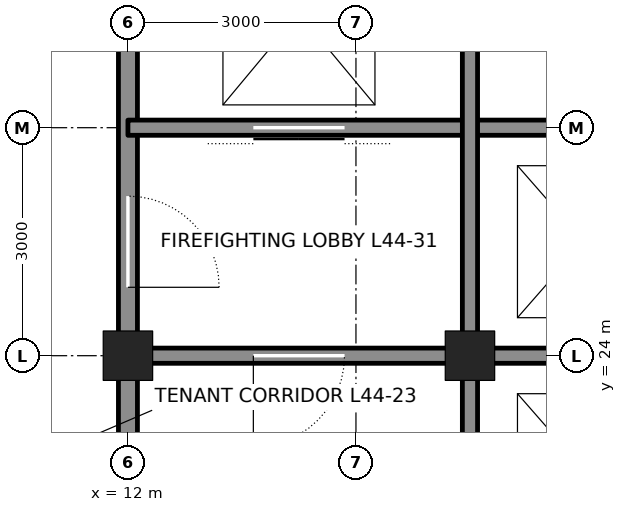
"""IFC4 building model, lengths in metres.
Left out: names, types, materials, properties, quantities, classifications, styles, units other than length and angle.
Written with IfcOpenShell. Run it as: python <this file> out.ifc"""

import sys

from ifc_helpers import new_model, si_unit, direction, frame, frame_2d, origin, origin_2d, place, context, subcontext, project, spatial, rectangle, hollow_rectangle, extrude, element, fill, save


model = new_model("IFC4")
c1 = context("Model", 3, precision=1e-05, world=origin(), true_north=direction((0.0, 1.0)))
c2 = subcontext(c1, "Body", "Model", "MODEL_VIEW")
j1 = project(units=[si_unit("LENGTHUNIT", "METRE"), si_unit("PLANEANGLEUNIT", "RADIAN")], contexts=[c1])
p1 = place(None, origin())
s1 = spatial("IfcSite", under=j1, at=p1, CompositionType="ELEMENT")
p2 = place(p1, origin())
s2 = spatial("IfcBuilding", under=s1, at=p2, CompositionType="ELEMENT")
p3 = place(p2, frame((0.0, 0.0, 201.3)))
s3 = spatial("IfcBuildingStorey", under=s2, at=p3, CompositionType="ELEMENT", Elevation=201.3)
for number, where, z_axis, x_axis in (
    (1, (12.0, 24.0, 0.0), (0.0, 0.0, 1.0), (1.0, 0.0, 0.0)),
    (2, (16.5, 24.0, 0.0), (0.0, 0.0, 1.0), (1.0, 0.0, 0.0)),
):
    element("IfcColumn", number, at=place(p3, frame(where, z_axis=z_axis, x_axis=x_axis)), inside=s3, PredefinedType="COLUMN", context=c2, shape_type="SweptSolid", body=[
        extrude(hollow_rectangle(XDim=0.65, YDim=0.65, WallThickness=0.065, at=origin_2d()), origin(), (0.0, 0.0, 1.0), 4.2),
    ])
p4 = place(p3, frame((12.0, 21.25, 0.0), z_axis=(0.0, 0.0, 1.0), x_axis=(0.0, 1.0, 0.0)))
e3 = element("IfcWall", 3, at=p4, inside=s3, PredefinedType="SOLIDWALL", context=c2, shape_type="SweptSolid", body=[
    extrude(rectangle(XDim=2.5, YDim=0.25, at=frame_2d((1.25, 0.0))), origin(), (0.0, 0.0, 1.0), 3.113),
])
p5 = place(p3, frame((12.0, 24.25, 0.0), z_axis=(0.0, 0.0, 1.0), x_axis=(0.0, 1.0, 0.0)))
e4 = element("IfcWall", 4, at=p5, inside=s3, PredefinedType="SOLIDWALL", context=c2, shape_type="SweptSolid", body=[
    extrude(rectangle(XDim=8.5, YDim=0.25, at=frame_2d((4.25, 0.0))), origin(), (0.0, 0.0, 1.0), 3.113),
])
p6 = place(p5, frame((0.65, 0.0, 0.0)))
e5 = element("IfcOpeningElement", 5, at=p6, cuts=e4, PredefinedType="OPENING", context=c2, shape_type="SweptSolid", body=[
    extrude(rectangle(XDim=1.2, YDim=2.1, at=frame_2d((0.6, 1.05))), frame((0.0, 0.135, 0.0), z_axis=(0.0, -1.0, 0.0), x_axis=(1.0, 0.0, 0.0)), (0.0, 0.0, 1.0), 0.27),
])
p7 = place(p5, frame((6.875, 0.0, 0.0)))
e6 = element("IfcOpeningElement", 6, at=p7, cuts=e4, PredefinedType="OPENING", context=c2, shape_type="SweptSolid", body=[
    extrude(rectangle(XDim=0.75, YDim=2.1, at=frame_2d((0.375, 1.05))), frame((0.0, 0.135, 0.0), z_axis=(0.0, -1.0, 0.0), x_axis=(1.0, 0.0, 0.0)), (0.0, 0.0, 1.0), 0.27),
])
p8 = place(p3, frame((12.25, 24.0, 0.0), z_axis=(0.0, 0.0, 1.0), x_axis=(1.0, 0.0, 0.0)))
e7 = element("IfcWall", 7, at=p8, inside=s3, PredefinedType="SOLIDWALL", context=c2, shape_type="SweptSolid", body=[
    extrude(rectangle(XDim=4.0, YDim=0.2, at=frame_2d((2.0, 0.0))), origin(), (0.0, 0.0, 1.0), 3.09),
])
p9 = place(p8, frame((1.4, 0.0, 0.0)))
e8 = element("IfcOpeningElement", 8, at=p9, cuts=e7, PredefinedType="OPENING", context=c2, shape_type="SweptSolid", body=[
    extrude(rectangle(XDim=1.2, YDim=2.1, at=frame_2d((0.6, 1.05))), frame((0.0, 0.11, 0.0), z_axis=(0.0, -1.0, 0.0), x_axis=(1.0, 0.0, 0.0)), (0.0, 0.0, 1.0), 0.22),
])
p10 = place(p3, frame((16.75, 24.0, 0.0), z_axis=(0.0, 0.0, 1.0), x_axis=(1.0, 0.0, 0.0)))
e9 = element("IfcWall", 9, at=p10, inside=s3, PredefinedType="SOLIDWALL", context=c2, shape_type="SweptSolid", body=[
    extrude(rectangle(XDim=2.75, YDim=0.2, at=frame_2d((1.375, 0.0))), origin(), (0.0, 0.0, 1.0), 3.09),
])
p11 = place(p3, frame((12.0, 27.0, 0.0), z_axis=(0.0, 0.0, 1.0), x_axis=(1.0, 0.0, 0.0)))
e10 = element("IfcWall", 10, at=p11, inside=s3, PredefinedType="SOLIDWALL", context=c2, shape_type="SweptSolid", body=[
    extrude(rectangle(XDim=7.5, YDim=0.2, at=frame_2d((3.75, 0.0))), origin(), (0.0, 0.0, 1.0), 4.04),
])
p12 = place(p11, frame((1.65, 0.0, 0.0)))
e11 = element("IfcOpeningElement", 11, at=p12, cuts=e10, PredefinedType="OPENING", context=c2, shape_type="SweptSolid", body=[
    extrude(rectangle(XDim=1.2, YDim=2.1, at=frame_2d((0.6, 1.05))), frame((0.0, 0.11, 0.0), z_axis=(0.0, -1.0, 0.0), x_axis=(1.0, 0.0, 0.0)), (0.0, 0.0, 1.0), 0.22),
])
p13 = place(p3, frame((16.5, 21.25, 0.0), z_axis=(0.0, 0.0, 1.0), x_axis=(0.0, 1.0, 0.0)))
e12 = element("IfcWall", 12, at=p13, inside=s3, PredefinedType="SOLIDWALL", context=c2, shape_type="SweptSolid", body=[
    extrude(rectangle(XDim=2.5, YDim=0.2, at=frame_2d((1.25, 0.0))), origin(), (0.0, 0.0, 1.0), 3.113),
])
p14 = place(p3, frame((16.5, 24.25, 0.0), z_axis=(0.0, 0.0, 1.0), x_axis=(0.0, 1.0, 0.0)))
e13 = element("IfcWall", 13, at=p14, inside=s3, PredefinedType="SOLIDWALL", context=c2, shape_type="SweptSolid", body=[
    extrude(rectangle(XDim=8.5, YDim=0.2, at=frame_2d((4.25, 0.0))), origin(), (0.0, 0.0, 1.0), 3.113),
])
p15 = place(p9, frame((1.2, 0.0, 0.0), z_axis=(0.0, 0.0, 1.0), x_axis=(-1.0, 0.0, 0.0)))
e14 = element("IfcDoor", 14, at=p15, inside=s3, OperationType="SINGLE_SWING_RIGHT", PredefinedType="DOOR", context=c2, shape_type="SweptSolid", body=[
    extrude(rectangle(XDim=1.2, YDim=2.1, at=frame_2d((0.6, 1.05))), frame((0.0, 0.025, 0.0), z_axis=(0.0, -1.0, 0.0), x_axis=(1.0, 0.0, 0.0)), (0.0, 0.0, 1.0), 0.05),
])
fill(e8, e14)
p16 = place(p6, frame((1.2, 0.0, 0.0), z_axis=(0.0, 0.0, 1.0), x_axis=(-1.0, 0.0, 0.0)))
e15 = element("IfcDoor", 15, at=p16, inside=s3, OperationType="SINGLE_SWING_RIGHT", PredefinedType="DOOR", context=c2, shape_type="SweptSolid", body=[
    extrude(rectangle(XDim=1.2, YDim=2.1, at=frame_2d((0.6, 1.05))), frame((0.0, 0.025, 0.0), z_axis=(0.0, -1.0, 0.0), x_axis=(1.0, 0.0, 0.0)), (0.0, 0.0, 1.0), 0.05),
])
fill(e5, e15)
p17 = place(p12, origin())
e16 = element("IfcDoor", 16, at=p17, inside=s3, OperationType="DOUBLE_DOOR_SLIDING", PredefinedType="DOOR", context=c2, shape_type="SweptSolid", body=[
    extrude(rectangle(XDim=1.2, YDim=2.1, at=frame_2d((0.6, 1.05))), frame((0.0, 0.025, 0.0), z_axis=(0.0, -1.0, 0.0), x_axis=(1.0, 0.0, 0.0)), (0.0, 0.0, 1.0), 0.05),
])
fill(e11, e16)
save(model, sys.argv[1])
